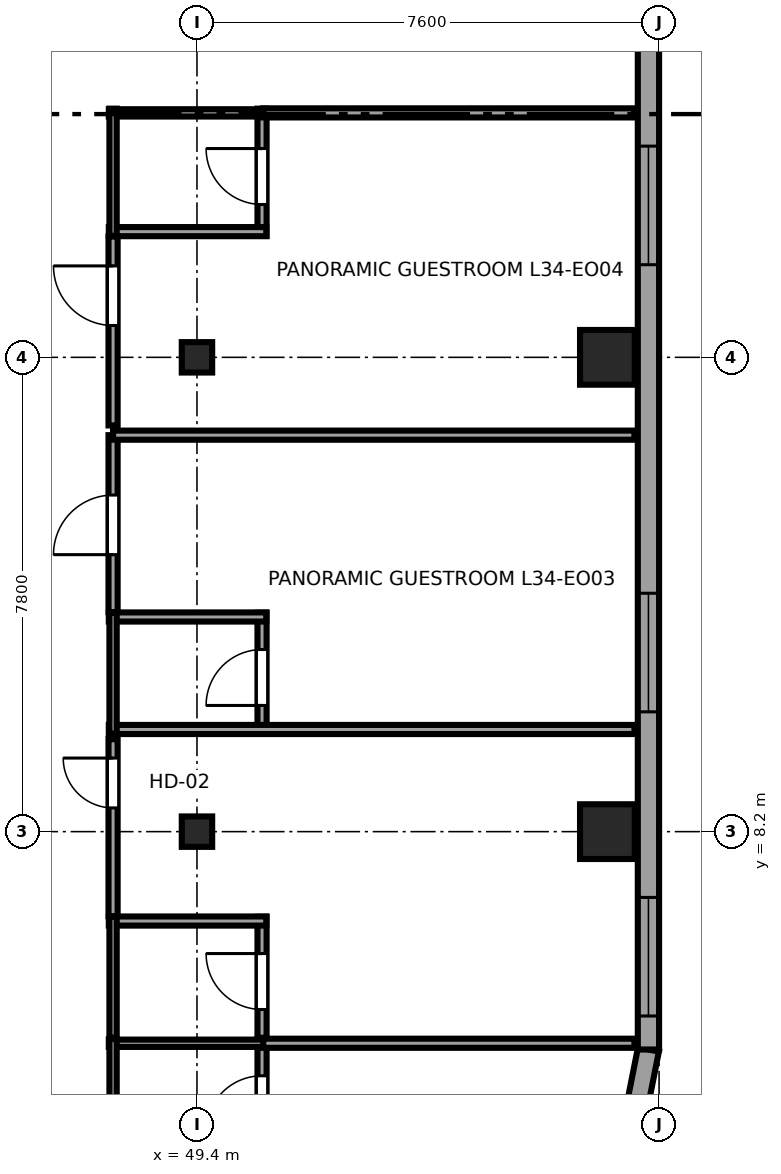
"""IFC4 building model, lengths in metres.
Left out: names, types, materials, properties, quantities, classifications, styles, units other than length and angle.
Written with IfcOpenShell. Run it as: python <this file> out.ifc"""

import sys

from ifc_helpers import new_model, si_unit, direction, frame, frame_2d, origin, origin_2d, place, context, subcontext, project, spatial, rectangle, i_section, extrude, source, transform, mapped, element, fill, save


model = new_model("IFC4")
c1 = context("Model", 3, precision=1e-05, world=origin(), true_north=direction((0.0, 1.0)))
c2 = subcontext(c1, "Body", "Model", "MODEL_VIEW")
j1 = project(units=[si_unit("LENGTHUNIT", "METRE"), si_unit("PLANEANGLEUNIT", "RADIAN")], contexts=[c1])
p1 = place(None, origin())
s1 = spatial("IfcSite", under=j1, at=p1, CompositionType="ELEMENT")
p2 = place(p1, origin())
s2 = spatial("IfcBuilding", under=s1, at=p2, CompositionType="ELEMENT")
p3 = place(p2, frame((0.0, 0.0, 132.85)))
s3 = spatial("IfcBuildingStorey", under=s2, at=p3, CompositionType="ELEMENT", Elevation=132.85)
m1 = source(origin(), c2, "Body", "SweptSolid", [
    extrude(i_section(OverallWidth=0.5, OverallDepth=0.5, WebThickness=0.022, FlangeThickness=0.034, at=origin_2d()), origin(), (0.0, 0.0, 1.0), 3.55),
])
for number, where, z_axis, x_axis in (
    (1, (49.4, 8.2, 0.0), (0.0, 0.0, 1.0), (1.0, 0.0, 0.0)),
    (2, (49.4, 16.0, 0.0), (0.0, 0.0, 1.0), (1.0, 0.0, 0.0)),
):
    element("IfcColumn", number, at=place(p3, frame(where, z_axis=z_axis, x_axis=x_axis)), inside=s3, PredefinedType="COLUMN", context=c2, shape_type="MappedRepresentation", body=[
        mapped(m1, transform((0.0, 0.0, 0.0), x_axis=(1.0, 0.0, 0.0), y_axis=(0.0, 1.0, 0.0), z_axis=(0.0, 0.0, 1.0), scale=1.0)),
    ])
m2 = source(origin(), c2, "Body", "SweptSolid", [
    extrude(rectangle(XDim=0.9, YDim=0.9, at=origin_2d()), origin(), (0.0, 0.0, 1.0), 3.55),
])
for number, where, z_axis, x_axis in (
    (3, (56.15, 8.2, 0.0), (0.0, 0.0, 1.0), (1.0, 0.0, 0.0)),
    (4, (56.15, 16.0, 0.0), (0.0, 0.0, 1.0), (1.0, 0.0, 0.0)),
):
    element("IfcColumn", number, at=place(p3, frame(where, z_axis=z_axis, x_axis=x_axis)), inside=s3, PredefinedType="COLUMN", context=c2, shape_type="MappedRepresentation", body=[
        mapped(m2, transform((0.0, 0.0, 0.0), x_axis=(1.0, 0.0, 0.0), y_axis=(0.0, 1.0, 0.0), z_axis=(0.0, 0.0, 1.0), scale=1.0)),
    ])
p4 = place(p3, frame((56.485, 2.908, 0.0), z_axis=(0.0, 0.0, 1.0), x_axis=(0.195011420161, 0.980800971659, 0.0)))
e5 = element("IfcWall", 5, at=p4, inside=s3, PredefinedType="SOLIDWALL", context=c2, shape_type="SweptSolid", body=[
    extrude(rectangle(XDim=1.743, YDim=0.35, at=frame_2d((0.871, 0.0))), origin(), (0.0, 0.0, 1.0), 3.37),
])
p5 = place(p3, frame((56.825, 4.617, 0.0), z_axis=(0.0, 0.0, 1.0), x_axis=(0.0, 1.0, 0.0)))
e6 = element("IfcWall", 6, at=p5, inside=s3, PredefinedType="SOLIDWALL", context=c2, shape_type="SweptSolid", body=[
    extrude(rectangle(XDim=36.766, YDim=0.35, at=frame_2d((18.383, 0.0))), origin(), (0.0, 0.0, 1.0), 3.37),
])
p6 = place(p5, frame((0.551, 0.0, 0.68)))
e7 = element("IfcOpeningElement", 7, at=p6, cuts=e6, PredefinedType="OPENING", context=c2, shape_type="SweptSolid", body=[
    extrude(rectangle(XDim=1.95, YDim=1.82, at=frame_2d((0.975, 0.91))), frame((0.0, 0.185, 0.0), z_axis=(0.0, -1.0, 0.0), x_axis=(1.0, 0.0, 0.0)), (0.0, 0.0, 1.0), 0.37),
])
p7 = place(p5, frame((5.553, 0.0, 0.68)))
e8 = element("IfcOpeningElement", 8, at=p7, cuts=e6, PredefinedType="OPENING", context=c2, shape_type="SweptSolid", body=[
    extrude(rectangle(XDim=1.95, YDim=1.82, at=frame_2d((0.975, 0.91))), frame((0.0, 0.185, 0.0), z_axis=(0.0, -1.0, 0.0), x_axis=(1.0, 0.0, 0.0)), (0.0, 0.0, 1.0), 0.37),
])
p8 = place(p5, frame((12.906, 0.0, 0.68)))
e9 = element("IfcOpeningElement", 9, at=p8, cuts=e6, PredefinedType="OPENING", context=c2, shape_type="SweptSolid", body=[
    extrude(rectangle(XDim=1.95, YDim=1.82, at=frame_2d((0.975, 0.91))), frame((0.0, 0.185, 0.0), z_axis=(0.0, -1.0, 0.0), x_axis=(1.0, 0.0, 0.0)), (0.0, 0.0, 1.0), 0.37),
])
p9 = place(p5, frame((21.36, 0.0, 0.68)))
e10 = element("IfcOpeningElement", 10, at=p9, cuts=e6, PredefinedType="OPENING", context=c2, shape_type="SweptSolid", body=[
    extrude(rectangle(XDim=1.95, YDim=1.82, at=frame_2d((0.975, 0.91))), frame((0.0, 0.185, 0.0), z_axis=(0.0, -1.0, 0.0), x_axis=(1.0, 0.0, 0.0)), (0.0, 0.0, 1.0), 0.37),
])
p10 = place(p5, frame((30.313, 0.0, 0.68)))
e11 = element("IfcOpeningElement", 11, at=p10, cuts=e6, PredefinedType="OPENING", context=c2, shape_type="SweptSolid", body=[
    extrude(rectangle(XDim=1.95, YDim=1.82, at=frame_2d((0.975, 0.91))), frame((0.0, 0.185, 0.0), z_axis=(0.0, -1.0, 0.0), x_axis=(1.0, 0.0, 0.0)), (0.0, 0.0, 1.0), 0.37),
])
p11 = place(p3, frame((50.47, 2.8, 0.0), z_axis=(0.0, 0.0, 1.0), x_axis=(0.0, 1.0, 0.0)))
e12 = element("IfcWall", 12, at=p11, inside=s3, PredefinedType="PARTITIONING", context=c2, shape_type="SweptSolid", body=[
    extrude(rectangle(XDim=1.99, YDim=0.15, at=frame_2d((0.995, 0.0))), origin(), (0.0, 0.0, 1.0), 3.37),
])
p12 = place(p11, frame((0.465, 0.0, 0.0)))
e13 = element("IfcOpeningElement", 13, at=p12, cuts=e12, PredefinedType="OPENING", context=c2, shape_type="SweptSolid", body=[
    extrude(rectangle(XDim=0.92, YDim=2.01, at=frame_2d((0.46, 1.005))), frame((0.0, 0.085, 0.0), z_axis=(0.0, -1.0, 0.0), x_axis=(1.0, 0.0, 0.0)), (0.0, 0.0, 1.0), 0.17),
])
p13 = place(p3, frame((47.95, 4.72, 0.0), z_axis=(0.0, 0.0, 1.0), x_axis=(1.0, 0.0, 0.0)))
e14 = element("IfcWall", 14, at=p13, inside=s3, PredefinedType="PLUMBINGWALL", context=c2, shape_type="SweptSolid", body=[
    extrude(rectangle(XDim=2.59, YDim=0.12, at=frame_2d((1.295, 0.0))), origin(), (0.0, 0.0, 1.0), 3.37),
])
p14 = place(p3, frame((48.02, 2.8, 0.0), z_axis=(0.0, 0.0, 1.0), x_axis=(0.0, 1.0, 0.0)))
e15 = element("IfcWall", 15, at=p14, inside=s3, PredefinedType="PLUMBINGWALL", context=c2, shape_type="SweptSolid", body=[
    extrude(rectangle(XDim=1.99, YDim=0.12, at=frame_2d((0.995, 0.0))), origin(), (0.0, 0.0, 1.0), 3.37),
])
p15 = place(p3, frame((50.47, 4.81, 0.0), z_axis=(0.0, 0.0, 1.0), x_axis=(0.0, 1.0, 0.0)))
e16 = element("IfcWall", 16, at=p15, inside=s3, PredefinedType="PARTITIONING", context=c2, shape_type="SweptSolid", body=[
    extrude(rectangle(XDim=1.99, YDim=0.15, at=frame_2d((0.995, 0.0))), origin(), (0.0, 0.0, 1.0), 3.37),
])
p16 = place(p15, frame((0.465, 0.0, 0.0)))
e17 = element("IfcOpeningElement", 17, at=p16, cuts=e16, PredefinedType="OPENING", context=c2, shape_type="SweptSolid", body=[
    extrude(rectangle(XDim=0.92, YDim=2.01, at=frame_2d((0.46, 1.005))), frame((0.0, 0.085, 0.0), z_axis=(0.0, -1.0, 0.0), x_axis=(1.0, 0.0, 0.0)), (0.0, 0.0, 1.0), 0.17),
])
p17 = place(p3, frame((47.95, 6.73, 0.0), z_axis=(0.0, 0.0, 1.0), x_axis=(1.0, 0.0, 0.0)))
e18 = element("IfcWall", 18, at=p17, inside=s3, PredefinedType="PARTITIONING", context=c2, shape_type="SweptSolid", body=[
    extrude(rectangle(XDim=2.59, YDim=0.15, at=frame_2d((1.295, 0.0))), origin(), (0.0, 0.0, 1.0), 3.37),
])
p18 = place(p3, frame((48.02, 4.81, 0.0), z_axis=(0.0, 0.0, 1.0), x_axis=(0.0, 1.0, 0.0)))
e19 = element("IfcWall", 19, at=p18, inside=s3, PredefinedType="PLUMBINGWALL", context=c2, shape_type="SweptSolid", body=[
    extrude(rectangle(XDim=1.99, YDim=0.12, at=frame_2d((0.995, 0.0))), origin(), (0.0, 0.0, 1.0), 3.37),
])
p19 = place(p3, frame((50.47, 9.81, 0.0), z_axis=(0.0, 0.0, 1.0), x_axis=(0.0, 1.0, 0.0)))
e20 = element("IfcWall", 20, at=p19, inside=s3, PredefinedType="PARTITIONING", context=c2, shape_type="SweptSolid", body=[
    extrude(rectangle(XDim=1.99, YDim=0.15, at=frame_2d((0.995, 0.0))), origin(), (0.0, 0.0, 1.0), 3.37),
])
p20 = place(p19, frame((0.465, 0.0, 0.0)))
e21 = element("IfcOpeningElement", 21, at=p20, cuts=e20, PredefinedType="OPENING", context=c2, shape_type="SweptSolid", body=[
    extrude(rectangle(XDim=0.92, YDim=2.01, at=frame_2d((0.46, 1.005))), frame((0.0, 0.085, 0.0), z_axis=(0.0, -1.0, 0.0), x_axis=(1.0, 0.0, 0.0)), (0.0, 0.0, 1.0), 0.17),
])
p21 = place(p3, frame((47.95, 9.88, 0.0), z_axis=(0.0, 0.0, 1.0), x_axis=(1.0, 0.0, 0.0)))
e22 = element("IfcWall", 22, at=p21, inside=s3, PredefinedType="PARTITIONING", context=c2, shape_type="SweptSolid", body=[
    extrude(rectangle(XDim=8.645, YDim=0.15, at=frame_2d((4.323, 0.0))), origin(), (0.0, 0.0, 1.0), 3.37),
])
p22 = place(p3, frame((47.95, 11.73, 0.0), z_axis=(0.0, 0.0, 1.0), x_axis=(1.0, 0.0, 0.0)))
e23 = element("IfcWall", 23, at=p22, inside=s3, PredefinedType="PARTITIONING", context=c2, shape_type="SweptSolid", body=[
    extrude(rectangle(XDim=2.59, YDim=0.15, at=frame_2d((1.295, 0.0))), origin(), (0.0, 0.0, 1.0), 3.37),
])
p23 = place(p3, frame((48.02, 9.81, 0.0), z_axis=(0.0, 0.0, 1.0), x_axis=(0.0, 1.0, 0.0)))
e24 = element("IfcWall", 24, at=p23, inside=s3, PredefinedType="PLUMBINGWALL", context=c2, shape_type="SweptSolid", body=[
    extrude(rectangle(XDim=1.99, YDim=0.12, at=frame_2d((0.995, 0.0))), origin(), (0.0, 0.0, 1.0), 3.37),
])
p24 = place(p3, frame((50.47, 17.997, 0.0), z_axis=(0.0, 0.0, 1.0), x_axis=(0.0, 1.0, 0.0)))
e25 = element("IfcWall", 25, at=p24, inside=s3, PredefinedType="PARTITIONING", context=c2, shape_type="SweptSolid", body=[
    extrude(rectangle(XDim=2.093, YDim=0.15, at=frame_2d((1.046, 0.0))), origin(), (0.0, 0.0, 1.0), 3.37),
])
p25 = place(p24, frame((0.517, 0.0, 0.0)))
e26 = element("IfcOpeningElement", 26, at=p25, cuts=e25, PredefinedType="OPENING", context=c2, shape_type="SweptSolid", body=[
    extrude(rectangle(XDim=0.92, YDim=2.01, at=frame_2d((0.46, 1.005))), frame((0.0, 0.085, 0.0), z_axis=(0.0, -1.0, 0.0), x_axis=(1.0, 0.0, 0.0)), (0.0, 0.0, 1.0), 0.17),
])
p26 = place(p3, frame((47.95, 18.067, 0.0), z_axis=(0.0, 0.0, 1.0), x_axis=(1.0, 0.0, 0.0)))
e27 = element("IfcWall", 27, at=p26, inside=s3, PredefinedType="PARTITIONING", context=c2, shape_type="SweptSolid", body=[
    extrude(rectangle(XDim=2.59, YDim=0.15, at=frame_2d((1.295, 0.0))), origin(), (0.0, 0.0, 1.0), 3.37),
])
p27 = place(p3, frame((47.95, 20.02, 0.0), z_axis=(0.0, 0.0, 1.0), x_axis=(1.0, 0.0, 0.0)))
e28 = element("IfcWall", 28, at=p27, inside=s3, PredefinedType="PLUMBINGWALL", context=c2, shape_type="SweptSolid", body=[
    extrude(rectangle(XDim=2.59, YDim=0.12, at=frame_2d((1.295, 0.0))), origin(), (0.0, 0.0, 1.0), 3.37),
])
p28 = place(p3, frame((48.02, 17.997, 0.0), z_axis=(0.0, 0.0, 1.0), x_axis=(0.0, 1.0, 0.0)))
e29 = element("IfcWall", 29, at=p28, inside=s3, PredefinedType="PLUMBINGWALL", context=c2, shape_type="SweptSolid", body=[
    extrude(rectangle(XDim=2.093, YDim=0.12, at=frame_2d((1.046, 0.0))), origin(), (0.0, 0.0, 1.0), 3.37),
])
p29 = place(p3, frame((50.49, 4.72, 0.0), z_axis=(0.0, 0.0, 1.0), x_axis=(1.0, 0.0, 0.0)))
e30 = element("IfcWall", 30, at=p29, inside=s3, PredefinedType="PARTITIONING", context=c2, shape_type="SweptSolid", body=[
    extrude(rectangle(XDim=6.105, YDim=0.15, at=frame_2d((3.052, 0.0))), origin(), (0.0, 0.0, 1.0), 3.37),
])
p30 = place(p3, frame((48.02, 6.81, 0.0), z_axis=(0.0, 0.0, 1.0), x_axis=(0.0, 1.0, 0.0)))
e31 = element("IfcWall", 31, at=p30, inside=s3, PredefinedType="PARTITIONING", context=c2, shape_type="SweptSolid", body=[
    extrude(rectangle(XDim=2.91, YDim=0.15, at=frame_2d((1.455, 0.0))), origin(), (0.0, 0.0, 1.0), 3.37),
])
p31 = place(p30, frame((1.78, 0.0, 0.0)))
e32 = element("IfcOpeningElement", 32, at=p31, cuts=e31, PredefinedType="OPENING", context=c2, shape_type="SweptSolid", body=[
    extrude(rectangle(XDim=0.82, YDim=2.01, at=frame_2d((0.41, 1.005))), frame((0.0, 0.085, 0.0), z_axis=(0.0, -1.0, 0.0), x_axis=(1.0, 0.0, 0.0)), (0.0, 0.0, 1.0), 0.17),
])
p32 = place(p3, frame((48.02, 11.81, 0.0), z_axis=(0.0, 0.0, 1.0), x_axis=(0.0, 1.0, 0.0)))
e33 = element("IfcWall", 33, at=p32, inside=s3, PredefinedType="PARTITIONING", context=c2, shape_type="SweptSolid", body=[
    extrude(rectangle(XDim=2.91, YDim=0.15, at=frame_2d((1.455, 0.0))), origin(), (0.0, 0.0, 1.0), 3.37),
])
p33 = place(p32, frame((0.945, 0.0, 0.0)))
e34 = element("IfcOpeningElement", 34, at=p33, cuts=e33, PredefinedType="OPENING", context=c2, shape_type="SweptSolid", body=[
    extrude(rectangle(XDim=0.98, YDim=2.12, at=frame_2d((0.49, 1.06))), frame((0.0, 0.085, 0.0), z_axis=(0.0, -1.0, 0.0), x_axis=(1.0, 0.0, 0.0)), (0.0, 0.0, 1.0), 0.17),
])
p34 = place(p3, frame((48.02, 14.72, 0.0), z_axis=(0.0, 0.0, 1.0), x_axis=(1.0, 0.0, 0.0)))
e35 = element("IfcWall", 35, at=p34, inside=s3, PredefinedType="PARTITIONING", context=c2, shape_type="SweptSolid", body=[
    extrude(rectangle(XDim=8.575, YDim=0.15, at=frame_2d((4.288, 0.0))), origin(), (0.0, 0.0, 1.0), 3.37),
])
p35 = place(p3, frame((48.02, 14.88, 0.0), z_axis=(0.0, 0.0, 1.0), x_axis=(0.0, 1.0, 0.0)))
e36 = element("IfcWall", 36, at=p35, inside=s3, PredefinedType="PARTITIONING", context=c2, shape_type="SweptSolid", body=[
    extrude(rectangle(XDim=3.107, YDim=0.15, at=frame_2d((1.554, 0.0))), origin(), (0.0, 0.0, 1.0), 3.37),
])
p36 = place(p35, frame((1.644, 0.0, 0.0)))
e37 = element("IfcOpeningElement", 37, at=p36, cuts=e36, PredefinedType="OPENING", context=c2, shape_type="SweptSolid", body=[
    extrude(rectangle(XDim=0.98, YDim=2.12, at=frame_2d((0.49, 1.06))), frame((0.0, 0.085, 0.0), z_axis=(0.0, -1.0, 0.0), x_axis=(1.0, 0.0, 0.0)), (0.0, 0.0, 1.0), 0.17),
])
p37 = place(p3, frame((50.49, 20.02, 0.0), z_axis=(0.0, 0.0, 1.0), x_axis=(1.0, 0.0, 0.0)))
e38 = element("IfcWall", 38, at=p37, inside=s3, PredefinedType="PARTITIONING", context=c2, shape_type="SweptSolid", body=[
    extrude(rectangle(XDim=6.105, YDim=0.15, at=frame_2d((3.052, 0.0))), origin(), (0.0, 0.0, 1.0), 3.37),
])
m3 = source(origin(), c2, "Body", "SweptSolid", [
    extrude(rectangle(XDim=1.95, YDim=1.82, at=frame_2d((0.975, 0.91))), frame((0.0, 0.09, 0.0), z_axis=(0.0, -1.0, 0.0), x_axis=(1.0, 0.0, 0.0)), (0.0, 0.0, 1.0), 0.06),
])
p38 = place(p6, origin())
e39 = element("IfcWindow", 39, at=p38, inside=s3, PartitioningType="DOUBLE_PANEL_VERTICAL", PredefinedType="WINDOW", context=c2, shape_type="MappedRepresentation", body=[
    mapped(m3, transform((0.0, 0.0, 0.0), x_axis=(1.0, 0.0, 0.0), y_axis=(0.0, 1.0, 0.0), z_axis=(0.0, 0.0, 1.0), scale=1.0)),
])
fill(e7, e39)
p39 = place(p7, origin())
e40 = element("IfcWindow", 40, at=p39, inside=s3, PartitioningType="DOUBLE_PANEL_VERTICAL", PredefinedType="WINDOW", context=c2, shape_type="MappedRepresentation", body=[
    mapped(m3, transform((0.0, 0.0, 0.0), x_axis=(1.0, 0.0, 0.0), y_axis=(0.0, 1.0, 0.0), z_axis=(0.0, 0.0, 1.0), scale=1.0)),
])
fill(e8, e40)
p40 = place(p8, origin())
e41 = element("IfcWindow", 41, at=p40, inside=s3, PartitioningType="DOUBLE_PANEL_VERTICAL", PredefinedType="WINDOW", context=c2, shape_type="MappedRepresentation", body=[
    mapped(m3, transform((0.0, 0.0, 0.0), x_axis=(1.0, 0.0, 0.0), y_axis=(0.0, 1.0, 0.0), z_axis=(0.0, 0.0, 1.0), scale=1.0)),
])
fill(e9, e41)
m4 = source(origin(), c2, "Body", "SweptSolid", [
    extrude(rectangle(XDim=0.92, YDim=2.01, at=frame_2d((0.46, 1.005))), frame((0.0, 0.025, 0.0), z_axis=(0.0, -1.0, 0.0), x_axis=(1.0, 0.0, 0.0)), (0.0, 0.0, 1.0), 0.05),
])
p41 = place(p12, origin())
e42 = element("IfcDoor", 42, at=p41, inside=s3, OperationType="SINGLE_SWING_LEFT", PredefinedType="DOOR", context=c2, shape_type="MappedRepresentation", body=[
    mapped(m4, transform((0.0, 0.0, 0.0), x_axis=(1.0, 0.0, 0.0), y_axis=(0.0, 1.0, 0.0), z_axis=(0.0, 0.0, 1.0), scale=1.0)),
])
fill(e13, e42)
p42 = place(p16, origin())
e43 = element("IfcDoor", 43, at=p42, inside=s3, OperationType="SINGLE_SWING_RIGHT", PredefinedType="DOOR", context=c2, shape_type="MappedRepresentation", body=[
    mapped(m4, transform((0.0, 0.0, 0.0), x_axis=(1.0, 0.0, 0.0), y_axis=(0.0, 1.0, 0.0), z_axis=(0.0, 0.0, 1.0), scale=1.0)),
])
fill(e17, e43)
p43 = place(p20, origin())
e44 = element("IfcDoor", 44, at=p43, inside=s3, OperationType="SINGLE_SWING_LEFT", PredefinedType="DOOR", context=c2, shape_type="MappedRepresentation", body=[
    mapped(m4, transform((0.0, 0.0, 0.0), x_axis=(1.0, 0.0, 0.0), y_axis=(0.0, 1.0, 0.0), z_axis=(0.0, 0.0, 1.0), scale=1.0)),
])
fill(e21, e44)
p44 = place(p25, origin())
e45 = element("IfcDoor", 45, at=p44, inside=s3, OperationType="SINGLE_SWING_RIGHT", PredefinedType="DOOR", context=c2, shape_type="MappedRepresentation", body=[
    mapped(m4, transform((0.0, 0.0, 0.0), x_axis=(1.0, 0.0, 0.0), y_axis=(0.0, 1.0, 0.0), z_axis=(0.0, 0.0, 1.0), scale=1.0)),
])
fill(e26, e45)
m5 = source(origin(), c2, "Body", "SweptSolid", [
    extrude(rectangle(XDim=0.82, YDim=2.01, at=frame_2d((0.41, 1.005))), frame((0.0, 0.025, 0.0), z_axis=(0.0, -1.0, 0.0), x_axis=(1.0, 0.0, 0.0)), (0.0, 0.0, 1.0), 0.05),
])
p45 = place(p31, origin())
e46 = element("IfcDoor", 46, at=p45, inside=s3, OperationType="SINGLE_SWING_RIGHT", PredefinedType="DOOR", context=c2, shape_type="MappedRepresentation", body=[
    mapped(m5, transform((0.0, 0.0, 0.0), x_axis=(1.0, 0.0, 0.0), y_axis=(0.0, 1.0, 0.0), z_axis=(0.0, 0.0, 1.0), scale=1.0)),
])
fill(e32, e46)
m6 = source(origin(), c2, "Body", "SweptSolid", [
    extrude(rectangle(XDim=0.98, YDim=2.12, at=frame_2d((0.49, 1.06))), frame((0.0, 0.025, 0.0), z_axis=(0.0, -1.0, 0.0), x_axis=(1.0, 0.0, 0.0)), (0.0, 0.0, 1.0), 0.05),
])
p46 = place(p33, origin())
e47 = element("IfcDoor", 47, at=p46, inside=s3, OperationType="SINGLE_SWING_LEFT", PredefinedType="DOOR", context=c2, shape_type="MappedRepresentation", body=[
    mapped(m6, transform((0.0, 0.0, 0.0), x_axis=(1.0, 0.0, 0.0), y_axis=(0.0, 1.0, 0.0), z_axis=(0.0, 0.0, 1.0), scale=1.0)),
])
fill(e34, e47)
p47 = place(p36, origin())
e48 = element("IfcDoor", 48, at=p47, inside=s3, OperationType="SINGLE_SWING_RIGHT", PredefinedType="DOOR", context=c2, shape_type="MappedRepresentation", body=[
    mapped(m6, transform((0.0, 0.0, 0.0), x_axis=(1.0, 0.0, 0.0), y_axis=(0.0, 1.0, 0.0), z_axis=(0.0, 0.0, 1.0), scale=1.0)),
])
fill(e37, e48)
save(model, sys.argv[1])
